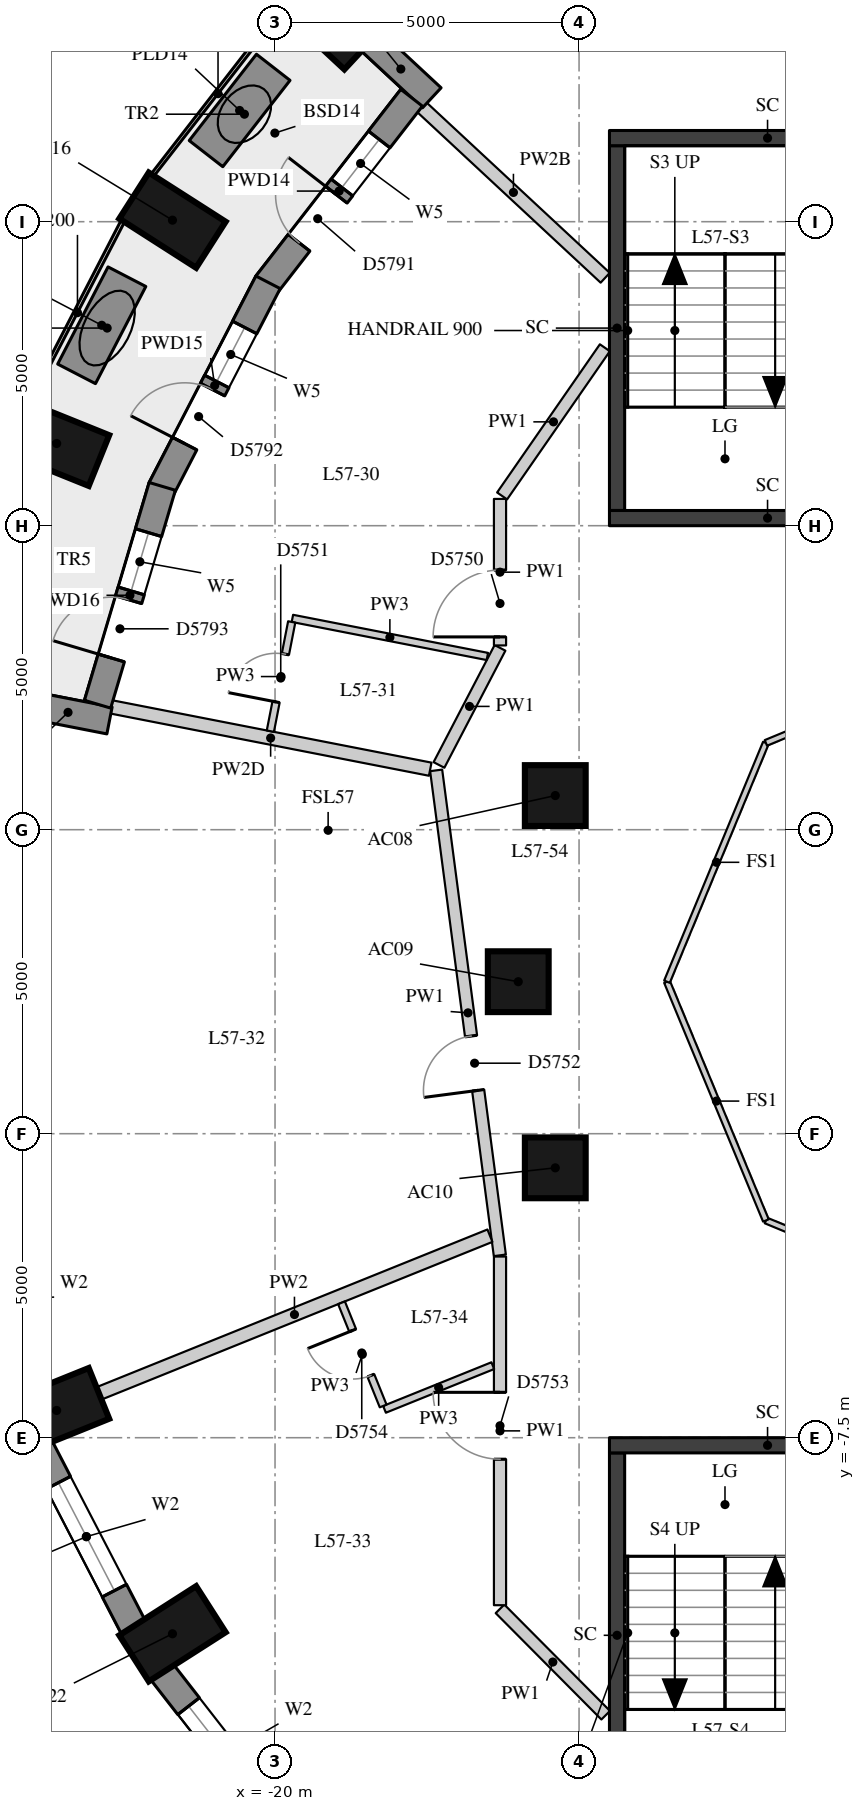
"""IFC4 building model, lengths in metres.
Left out: names, types, materials, properties, quantities, classifications, styles, units other than length and angle.
Written with IfcOpenShell. Run it as: python <this file> out.ifc"""

import sys

from ifc_helpers import new_model, si_unit, direction, frame, frame_2d, origin, origin_2d, place, context, subcontext, project, spatial, rectangle, extrude, element, fill, save


model = new_model("IFC4")
c1 = context("Model", 3, precision=1e-05, world=origin(), true_north=direction((0.0, 1.0)))
c2 = subcontext(c1, "Body", "Model", "MODEL_VIEW")
j1 = project(units=[si_unit("LENGTHUNIT", "METRE"), si_unit("PLANEANGLEUNIT", "RADIAN")], contexts=[c1])
p1 = place(None, origin())
s1 = spatial("IfcSite", under=j1, at=p1, CompositionType="ELEMENT")
p2 = place(p1, origin())
s2 = spatial("IfcBuilding", under=s1, at=p2, CompositionType="ELEMENT")
p3 = place(p2, frame((0.0, 0.0, 202.4)))
s3 = spatial("IfcBuildingStorey", under=s2, at=p3, CompositionType="ELEMENT", Elevation=202.4)
for number, where, z_axis, x_axis in (
    (1, (-19.102, 15.845, 0.0), (0.0, 0.0, 1.0), (-0.732, 0.681, 0.0)),
    (2, (-21.687, 12.525, 0.0), (0.0, 0.0, 1.0), (-0.842, 0.539, 0.0)),
    (3, (-23.591, 8.852, 0.0), (0.0, 0.0, 1.0), (-0.927, 0.374, 0.0)),
    (4, (-23.591, -7.052, 0.0), (0.0, 0.0, 1.0), (-0.927, -0.374, 0.0)),
    (5, (-21.687, -10.725, 0.0), (0.0, 0.0, 1.0), (-0.842, -0.539, 0.0)),
):
    element("IfcColumn", number, at=place(p3, frame(where, z_axis=z_axis, x_axis=x_axis)), inside=s3, PredefinedType="COLUMN", context=c2, shape_type="SweptSolid", body=[
        extrude(rectangle(XDim=1.5, YDim=0.9, at=origin_2d()), origin(), (0.0, 0.0, 1.0), 3.3),
    ])
for number, where, z_axis, x_axis in (
    (6, (-15.391, 3.062, 0.0), (0.0, 0.0, 1.0), (1.0, 0.0, 0.0)),
    (7, (-16.0, 0.0, 0.0), (0.0, 0.0, 1.0), (1.0, 0.0, 0.0)),
    (8, (-15.391, -3.062, 0.0), (0.0, 0.0, 1.0), (1.0, 0.0, 0.0)),
):
    element("IfcColumn", number, at=place(p3, frame(where, z_axis=z_axis, x_axis=x_axis)), inside=s3, PredefinedType="COLUMN", context=c2, shape_type="SweptSolid", body=[
        extrude(rectangle(XDim=1.0, YDim=1.0, at=origin_2d()), origin(), (0.0, 0.0, 1.0), 3.3),
    ])
p4 = place(p3, frame((-23.878, -7.632, 0.0), z_axis=(0.0, 0.0, 1.0), x_axis=(0.460232593174, -0.887798378113, 0.0)))
e9 = element("IfcWall", 9, at=p4, inside=s3, PredefinedType="SOLIDWALL", context=c2, shape_type="SweptSolid", body=[
    extrude(rectangle(XDim=3.371, YDim=0.45, at=frame_2d((1.685, 0.0))), origin(), (0.0, 0.0, 1.0), 3.02),
])
p5 = place(p4, frame((0.685, 0.0, 0.4)))
e10 = element("IfcOpeningElement", 10, at=p5, cuts=e9, PredefinedType="OPENING", context=c2, shape_type="SweptSolid", body=[
    extrude(rectangle(XDim=2.0, YDim=1.75, at=frame_2d((1.0, 0.875))), frame((0.0, 0.235, 0.0), z_axis=(0.0, -1.0, 0.0), x_axis=(1.0, 0.0, 0.0)), (0.0, 0.0, 1.0), 0.47),
])
p6 = place(p3, frame((-21.863, -11.348, 0.0), z_axis=(0.0, 0.0, 1.0), x_axis=(0.614255239631, -0.789107407509, 0.0)))
e11 = element("IfcWall", 11, at=p6, inside=s3, PredefinedType="SOLIDWALL", context=c2, shape_type="SweptSolid", body=[
    extrude(rectangle(XDim=3.438, YDim=0.45, at=frame_2d((1.719, 0.0))), origin(), (0.0, 0.0, 1.0), 3.02),
])
p7 = place(p6, frame((0.719, 0.0, 0.4)))
e12 = element("IfcOpeningElement", 12, at=p7, cuts=e11, PredefinedType="OPENING", context=c2, shape_type="SweptSolid", body=[
    extrude(rectangle(XDim=2.0, YDim=1.75, at=frame_2d((1.0, 0.875))), frame((0.0, 0.235, 0.0), z_axis=(0.0, -1.0, 0.0), x_axis=(1.0, 0.0, 0.0)), (0.0, 0.0, 1.0), 0.47),
])
p8 = place(p3, frame((-18.44, 15.484, 0.0), z_axis=(0.0, 0.0, 1.0), x_axis=(0.732268156969, -0.681016406769, 0.0)))
e13 = element("IfcWall", 13, at=p8, inside=s3, PredefinedType="SOLIDWALL", context=c2, shape_type="SweptSolid", body=[
    extrude(rectangle(XDim=1.391, YDim=0.45, at=frame_2d((0.695, 0.0))), origin(), (0.0, 0.0, 1.0), 2.57),
])
p9 = place(p3, frame((-24.087, 4.563, 0.0), z_axis=(0.0, 0.0, 1.0), x_axis=(0.98143579878, -0.191790961394, 0.0)))
e14 = element("IfcWall", 14, at=p9, inside=s3, PredefinedType="SOLIDWALL", context=c2, shape_type="SweptSolid", body=[
    extrude(rectangle(XDim=1.39, YDim=0.45, at=frame_2d((0.695, 0.0))), origin(), (0.0, 0.0, 1.0), 2.47),
])
p10 = place(p3, frame((-17.754, 14.539, 0.0), z_axis=(0.0, 0.0, 1.0), x_axis=(-0.613174901215, -0.789947175779, 0.0)))
e15 = element("IfcWall", 15, at=p10, inside=s3, PredefinedType="SOLIDWALL", context=c2, shape_type="SweptSolid", body=[
    extrude(rectangle(XDim=3.886, YDim=0.45, at=frame_2d((1.943, 0.0))), origin(), (0.0, 0.0, 1.0), 3.02),
])
p11 = place(p10, frame((0.868, 0.0, 0.4)))
e16 = element("IfcOpeningElement", 16, at=p11, cuts=e15, PredefinedType="OPENING", context=c2, shape_type="SweptSolid", body=[
    extrude(rectangle(XDim=1.0, YDim=1.75, at=frame_2d((0.5, 0.875))), frame((0.0, 0.235, 0.0), z_axis=(0.0, -1.0, 0.0), x_axis=(1.0, 0.0, 0.0)), (0.0, 0.0, 1.0), 0.47),
])
p12 = place(p10, frame((2.018, 0.0, 0.0)))
e17 = element("IfcOpeningElement", 17, at=p12, cuts=e15, PredefinedType="OPENING", context=c2, shape_type="SweptSolid", body=[
    extrude(rectangle(XDim=1.0, YDim=2.15, at=frame_2d((0.5, 1.075))), frame((0.0, 0.235, 0.0), z_axis=(0.0, -1.0, 0.0), x_axis=(1.0, 0.0, 0.0)), (0.0, 0.0, 1.0), 0.47),
])
p13 = place(p3, frame((-20.115, 11.503, 0.0), z_axis=(0.0, 0.0, 1.0), x_axis=(-0.459205720451, -0.888329953511, 0.0)))
e18 = element("IfcWall", 18, at=p13, inside=s3, PredefinedType="SOLIDWALL", context=c2, shape_type="SweptSolid", body=[
    extrude(rectangle(XDim=3.823, YDim=0.45, at=frame_2d((1.911, 0.0))), origin(), (0.0, 0.0, 1.0), 3.02),
])
p14 = place(p13, frame((0.836, 0.0, 0.4)))
e19 = element("IfcOpeningElement", 19, at=p14, cuts=e18, PredefinedType="OPENING", context=c2, shape_type="SweptSolid", body=[
    extrude(rectangle(XDim=1.0, YDim=1.75, at=frame_2d((0.5, 0.875))), frame((0.0, 0.235, 0.0), z_axis=(0.0, -1.0, 0.0), x_axis=(1.0, 0.0, 0.0)), (0.0, 0.0, 1.0), 0.47),
])
p15 = place(p13, frame((1.986, 0.0, 0.0)))
e20 = element("IfcOpeningElement", 20, at=p15, cuts=e18, PredefinedType="OPENING", context=c2, shape_type="SweptSolid", body=[
    extrude(rectangle(XDim=1.0, YDim=2.15, at=frame_2d((0.5, 1.075))), frame((0.0, 0.235, 0.0), z_axis=(0.0, -1.0, 0.0), x_axis=(1.0, 0.0, 0.0)), (0.0, 0.0, 1.0), 0.47),
])
p16 = place(p3, frame((-21.854, 8.146, 0.0), z_axis=(0.0, 0.0, 1.0), x_axis=(-0.284757753004, -0.958599510799, 0.0)))
e21 = element("IfcWall", 21, at=p16, inside=s3, PredefinedType="SOLIDWALL", context=c2, shape_type="SweptSolid", body=[
    extrude(rectangle(XDim=3.737, YDim=0.45, at=frame_2d((1.869, 0.0))), origin(), (0.0, 0.0, 1.0), 3.02),
])
p17 = place(p16, frame((0.794, 0.0, 0.4)))
e22 = element("IfcOpeningElement", 22, at=p17, cuts=e21, PredefinedType="OPENING", context=c2, shape_type="SweptSolid", body=[
    extrude(rectangle(XDim=1.0, YDim=1.75, at=frame_2d((0.5, 0.875))), frame((0.0, 0.235, 0.0), z_axis=(0.0, -1.0, 0.0), x_axis=(1.0, 0.0, 0.0)), (0.0, 0.0, 1.0), 0.47),
])
p18 = place(p16, frame((1.944, 0.0, 0.0)))
e23 = element("IfcOpeningElement", 23, at=p18, cuts=e21, PredefinedType="OPENING", context=c2, shape_type="SweptSolid", body=[
    extrude(rectangle(XDim=1.0, YDim=2.15, at=frame_2d((0.5, 1.075))), frame((0.0, 0.235, 0.0), z_axis=(0.0, -1.0, 0.0), x_axis=(1.0, 0.0, 0.0)), (0.0, 0.0, 1.0), 0.47),
])
for number, where, z_axis, x_axis in (
    (24, (-20.03, 15.04, 0.0), (0.0, 0.0, 1.0), (-0.614, -0.789, 0.0)),
    (25, (-22.436, 11.595, 0.0), (0.0, 0.0, 1.0), (-0.46, -0.888, 0.0)),
):
    element("IfcWall", number, at=place(p3, frame(where, z_axis=z_axis, x_axis=x_axis)), inside=s3, PredefinedType="USERDEFINED", context=c2, shape_type="SweptSolid", body=[
        extrude(rectangle(XDim=1.8, YDim=0.7, at=frame_2d((0.9, 0.0))), origin(), (0.0, 0.0, 1.0), 0.75),
    ])
p19 = place(p3, frame((-14.375, 7.75, -0.28), z_axis=(0.0, 0.0, 1.0), x_axis=(0.0, 1.0, 0.0)))
e26 = element("IfcWall", 26, at=p19, inside=s3, PredefinedType="SHEAR", context=c2, shape_type="SweptSolid", body=[
    extrude(rectangle(XDim=6.0, YDim=0.25, at=frame_2d((3.0, 0.0))), origin(), (0.0, 0.0, 1.0), 3.3),
])
for number, where, z_axis, x_axis in (
    (27, (-14.5, 13.875, -0.28), (0.0, 0.0, 1.0), (1.0, 0.0, 0.0)),
    (28, (-14.5, 7.625, -0.28), (0.0, 0.0, 1.0), (1.0, 0.0, 0.0)),
):
    element("IfcWall", number, at=place(p3, frame(where, z_axis=z_axis, x_axis=x_axis)), inside=s3, PredefinedType="SHEAR", context=c2, shape_type="SweptSolid", body=[
        extrude(rectangle(XDim=5.2, YDim=0.25, at=frame_2d((2.6, 0.0))), origin(), (0.0, 0.0, 1.0), 3.3),
    ])
p20 = place(p3, frame((-14.375, -13.75, -0.28), z_axis=(0.0, 0.0, 1.0), x_axis=(0.0, 1.0, 0.0)))
e29 = element("IfcWall", 29, at=p20, inside=s3, PredefinedType="SHEAR", context=c2, shape_type="SweptSolid", body=[
    extrude(rectangle(XDim=6.0, YDim=0.25, at=frame_2d((3.0, 0.0))), origin(), (0.0, 0.0, 1.0), 3.3),
])
p21 = place(p3, frame((-14.5, -7.625, -0.28), z_axis=(0.0, 0.0, 1.0), x_axis=(1.0, 0.0, 0.0)))
e30 = element("IfcWall", 30, at=p21, inside=s3, PredefinedType="SHEAR", context=c2, shape_type="SweptSolid", body=[
    extrude(rectangle(XDim=5.2, YDim=0.25, at=frame_2d((2.6, 0.0))), origin(), (0.0, 0.0, 1.0), 3.3),
])
p22 = place(p3, frame((-14.562, -12.064, 0.0), z_axis=(0.0, 0.0, 1.0), x_axis=(-0.704826289083, 0.709379942074, 0.0)))
e31 = element("IfcWall", 31, at=p22, inside=s3, PredefinedType="PARTITIONING", context=c2, shape_type="SweptSolid", body=[
    extrude(rectangle(XDim=2.466, YDim=0.2, at=frame_2d((1.233, 0.0))), origin(), (0.0, 0.0, 1.0), 3.02),
])
p23 = place(p3, frame((-16.3, -10.255, 0.0), z_axis=(0.0, 0.0, 1.0), x_axis=(0.0, 1.0, 0.0)))
e32 = element("IfcWall", 32, at=p23, inside=s3, PredefinedType="PARTITIONING", context=c2, shape_type="SweptSolid", body=[
    extrude(rectangle(XDim=5.734, YDim=0.2, at=frame_2d((2.867, 0.0))), origin(), (0.0, 0.0, 1.0), 3.02),
])
p24 = place(p23, frame((2.401, 0.0, 0.0)))
e33 = element("IfcOpeningElement", 33, at=p24, cuts=e32, PredefinedType="OPENING", context=c2, shape_type="SweptSolid", body=[
    extrude(rectangle(XDim=1.1, YDim=2.1, at=frame_2d((0.55, 1.05))), frame((0.0, 0.11, 0.0), z_axis=(0.0, -1.0, 0.0), x_axis=(1.0, 0.0, 0.0)), (0.0, 0.0, 1.0), 0.22),
])
p25 = place(p3, frame((-16.303, -4.501, 0.0), z_axis=(0.0, 0.0, 1.0), x_axis=(-0.130191522351, 0.991488864036, 0.0)))
e34 = element("IfcWall", 34, at=p25, inside=s3, PredefinedType="PARTITIONING", context=c2, shape_type="SweptSolid", body=[
    extrude(rectangle(XDim=8.045, YDim=0.2, at=frame_2d((4.022, 0.0))), origin(), (0.0, 0.0, 1.0), 3.02),
])
p26 = place(p25, frame((2.738, 0.0, 0.0)))
e35 = element("IfcOpeningElement", 35, at=p26, cuts=e34, PredefinedType="OPENING", context=c2, shape_type="SweptSolid", body=[
    extrude(rectangle(XDim=0.9, YDim=2.1, at=frame_2d((0.45, 1.05))), frame((0.0, 0.11, 0.0), z_axis=(0.0, -1.0, 0.0), x_axis=(1.0, 0.0, 0.0)), (0.0, 0.0, 1.0), 0.22),
])
p27 = place(p3, frame((-17.304, 3.565, 0.0), z_axis=(0.0, 0.0, 1.0), x_axis=(0.46212415324, 0.886815238363, 0.0)))
e36 = element("IfcWall", 36, at=p27, inside=s3, PredefinedType="PARTITIONING", context=c2, shape_type="SweptSolid", body=[
    extrude(rectangle(XDim=2.172, YDim=0.2, at=frame_2d((1.086, 0.0))), origin(), (0.0, 0.0, 1.0), 3.02),
])
p28 = place(p3, frame((-16.3, 5.531, 0.0), z_axis=(0.0, 0.0, 1.0), x_axis=(0.0, 1.0, 0.0)))
e37 = element("IfcWall", 37, at=p28, inside=s3, PredefinedType="PARTITIONING", context=c2, shape_type="SweptSolid", body=[
    extrude(rectangle(XDim=2.409, YDim=0.2, at=frame_2d((1.205, 0.0))), origin(), (0.0, 0.0, 1.0), 3.02),
])
p29 = place(p28, frame((0.14, 0.0, 0.0)))
e38 = element("IfcOpeningElement", 38, at=p29, cuts=e37, PredefinedType="OPENING", context=c2, shape_type="SweptSolid", body=[
    extrude(rectangle(XDim=1.1, YDim=2.1, at=frame_2d((0.55, 1.05))), frame((0.0, 0.11, 0.0), z_axis=(0.0, -1.0, 0.0), x_axis=(1.0, 0.0, 0.0)), (0.0, 0.0, 1.0), 0.22),
])
p30 = place(p3, frame((-16.266, 7.989, 0.0), z_axis=(0.0, 0.0, 1.0), x_axis=(0.569860411146, 0.821741511552, 0.0)))
e39 = element("IfcWall", 39, at=p30, inside=s3, PredefinedType="PARTITIONING", context=c2, shape_type="SweptSolid", body=[
    extrude(rectangle(XDim=2.966, YDim=0.2, at=frame_2d((1.483, 0.0))), origin(), (0.0, 0.0, 1.0), 3.02),
])
p31 = place(p3, frame((-17.588, 14.385, 0.0), z_axis=(0.0, 0.0, 1.0), x_axis=(0.732259547802, -0.681025663725, 0.0)))
e40 = element("IfcWall", 40, at=p31, inside=s3, PredefinedType="PARTITIONING", context=c2, shape_type="SweptSolid", body=[
    extrude(rectangle(XDim=4.122, YDim=0.22, at=frame_2d((2.061, 0.0))), origin(), (0.0, 0.0, 1.0), 2.57),
])
p32 = place(p3, frame((-22.697, 4.521, 0.0), z_axis=(0.0, 0.0, 1.0), x_axis=(0.981448712972, -0.19172486486, 0.0)))
e41 = element("IfcWall", 41, at=p32, inside=s3, PredefinedType="PARTITIONING", context=c2, shape_type="SweptSolid", body=[
    extrude(rectangle(XDim=5.348, YDim=0.22, at=frame_2d((2.674, 0.0))), origin(), (0.0, 0.0, 1.0), 2.47),
])
p33 = place(p3, frame((-22.896, -6.771, 0.0), z_axis=(0.0, 0.0, 1.0), x_axis=(0.927377440276, 0.374127095073, 0.0)))
e42 = element("IfcWall", 42, at=p33, inside=s3, PredefinedType="PARTITIONING", context=c2, shape_type="SweptSolid", body=[
    extrude(rectangle(XDim=6.933, YDim=0.22, at=frame_2d((3.467, 0.0))), origin(), (0.0, 0.0, 1.0), 3.02),
])
p34 = place(p3, frame((-16.508, 5.349, 0.0), z_axis=(0.0, 0.0, 1.0), x_axis=(-0.981441910277, 0.191759684898, 0.0)))
e43 = element("IfcWall", 43, at=p34, inside=s3, PredefinedType="PARTITIONING", context=c2, shape_type="SweptSolid", body=[
    extrude(rectangle(XDim=3.267, YDim=0.12, at=frame_2d((1.633, 0.0))), origin(), (0.0, 0.0, 1.0), 3.02),
])
p35 = place(p3, frame((-16.419, -6.315, 0.0), z_axis=(0.0, 0.0, 1.0), x_axis=(-0.927358946461, -0.374172933841, 0.0)))
e44 = element("IfcWall", 44, at=p35, inside=s3, PredefinedType="PARTITIONING", context=c2, shape_type="SweptSolid", body=[
    extrude(rectangle(XDim=1.92, YDim=0.12, at=frame_2d((0.96, 0.0))), origin(), (0.0, 0.0, 1.0), 3.02),
])
p36 = place(p3, frame((-19.726, 5.917, 0.0), z_axis=(0.0, 0.0, 1.0), x_axis=(-0.191830051998, -0.981428158935, 0.0)))
e45 = element("IfcWall", 45, at=p36, inside=s3, PredefinedType="PARTITIONING", context=c2, shape_type="SweptSolid", body=[
    extrude(rectangle(XDim=1.83, YDim=0.12, at=frame_2d((0.915, 0.0))), origin(), (0.0, 0.0, 1.0), 3.02),
])
p37 = place(p36, frame((0.54, 0.0, 0.0)))
e46 = element("IfcOpeningElement", 46, at=p37, cuts=e45, PredefinedType="OPENING", context=c2, shape_type="SweptSolid", body=[
    extrude(rectangle(XDim=0.8, YDim=2.1, at=frame_2d((0.4, 1.05))), frame((0.0, 0.07, 0.0), z_axis=(0.0, -1.0, 0.0), x_axis=(1.0, 0.0, 0.0)), (0.0, 0.0, 1.0), 0.14),
])
p38 = place(p3, frame((-18.222, -6.978, 0.0), z_axis=(0.0, 0.0, 1.0), x_axis=(-0.374218187905, 0.927340685963, 0.0)))
e47 = element("IfcWall", 47, at=p38, inside=s3, PredefinedType="PARTITIONING", context=c2, shape_type="SweptSolid", body=[
    extrude(rectangle(XDim=1.83, YDim=0.12, at=frame_2d((0.915, 0.0))), origin(), (0.0, 0.0, 1.0), 3.02),
])
p39 = place(p38, frame((0.54, 0.0, 0.0)))
e48 = element("IfcOpeningElement", 48, at=p39, cuts=e47, PredefinedType="OPENING", context=c2, shape_type="SweptSolid", body=[
    extrude(rectangle(XDim=0.8, YDim=2.1, at=frame_2d((0.4, 1.05))), frame((0.0, 0.07, 0.0), z_axis=(0.0, -1.0, 0.0), x_axis=(1.0, 0.0, 0.0)), (0.0, 0.0, 1.0), 0.14),
])
for number, where, z_axis, x_axis in (
    (49, (-8.0, -5.554, 0.0), (0.0, 0.0, 1.0), (-0.924, 0.383, 0.0)),
    (50, (-11.927, -3.927, 0.0), (0.0, 0.0, 1.0), (-0.383, 0.924, 0.0)),
    (51, (-13.554, 0.0, 0.0), (0.0, 0.0, 1.0), (0.383, 0.924, 0.0)),
    (52, (-11.927, 3.927, 0.0), (0.0, 0.0, 1.0), (0.924, 0.383, 0.0)),
):
    element("IfcWall", number, at=place(p3, frame(where, z_axis=z_axis, x_axis=x_axis)), inside=s3, PredefinedType="PARTITIONING", context=c2, shape_type="SweptSolid", body=[
        extrude(rectangle(XDim=4.251, YDim=0.1, at=frame_2d((2.125, 0.0))), origin(), (0.0, 0.0, 1.0), 3.02),
    ])
p40 = place(p5, origin())
e53 = element("IfcWindow", 53, at=p40, inside=s3, PartitioningType="SINGLE_PANEL", PredefinedType="WINDOW", context=c2, shape_type="SweptSolid", body=[
    extrude(rectangle(XDim=2.0, YDim=1.75, at=frame_2d((1.0, 0.875))), frame((0.0, 0.035, 0.0), z_axis=(0.0, -1.0, 0.0), x_axis=(1.0, 0.0, 0.0)), (0.0, 0.0, 1.0), 0.06),
])
fill(e10, e53)
p41 = place(p7, origin())
e54 = element("IfcWindow", 54, at=p41, inside=s3, PartitioningType="SINGLE_PANEL", PredefinedType="WINDOW", context=c2, shape_type="SweptSolid", body=[
    extrude(rectangle(XDim=2.0, YDim=1.75, at=frame_2d((1.0, 0.875))), frame((0.0, 0.035, 0.0), z_axis=(0.0, -1.0, 0.0), x_axis=(1.0, 0.0, 0.0)), (0.0, 0.0, 1.0), 0.06),
])
fill(e12, e54)
p42 = place(p11, origin())
e55 = element("IfcWindow", 55, at=p42, inside=s3, PartitioningType="SINGLE_PANEL", PredefinedType="WINDOW", context=c2, shape_type="SweptSolid", body=[
    extrude(rectangle(XDim=1.0, YDim=1.75, at=frame_2d((0.5, 0.875))), frame((0.0, 0.035, 0.0), z_axis=(0.0, -1.0, 0.0), x_axis=(1.0, 0.0, 0.0)), (0.0, 0.0, 1.0), 0.06),
])
fill(e16, e55)
p43 = place(p12, frame((1.0, 0.0, 0.0), z_axis=(0.0, 0.0, 1.0), x_axis=(-1.0, 0.0, 0.0)))
e56 = element("IfcDoor", 56, at=p43, inside=s3, OperationType="SINGLE_SWING_RIGHT", PredefinedType="DOOR", context=c2, shape_type="SweptSolid", body=[
    extrude(rectangle(XDim=1.0, YDim=2.15, at=frame_2d((0.5, 1.075))), frame((0.0, 0.075, 0.0), z_axis=(0.0, -1.0, 0.0), x_axis=(1.0, 0.0, 0.0)), (0.0, 0.0, 1.0), 0.05),
])
fill(e17, e56)
p44 = place(p14, origin())
e57 = element("IfcWindow", 57, at=p44, inside=s3, PartitioningType="SINGLE_PANEL", PredefinedType="WINDOW", context=c2, shape_type="SweptSolid", body=[
    extrude(rectangle(XDim=1.0, YDim=1.75, at=frame_2d((0.5, 0.875))), frame((0.0, 0.035, 0.0), z_axis=(0.0, -1.0, 0.0), x_axis=(1.0, 0.0, 0.0)), (0.0, 0.0, 1.0), 0.06),
])
fill(e19, e57)
p45 = place(p15, frame((1.0, 0.0, 0.0), z_axis=(0.0, 0.0, 1.0), x_axis=(-1.0, 0.0, 0.0)))
e58 = element("IfcDoor", 58, at=p45, inside=s3, OperationType="SINGLE_SWING_LEFT", PredefinedType="DOOR", context=c2, shape_type="SweptSolid", body=[
    extrude(rectangle(XDim=1.0, YDim=2.15, at=frame_2d((0.5, 1.075))), frame((0.0, 0.075, 0.0), z_axis=(0.0, -1.0, 0.0), x_axis=(1.0, 0.0, 0.0)), (0.0, 0.0, 1.0), 0.05),
])
fill(e20, e58)
p46 = place(p17, origin())
e59 = element("IfcWindow", 59, at=p46, inside=s3, PartitioningType="SINGLE_PANEL", PredefinedType="WINDOW", context=c2, shape_type="SweptSolid", body=[
    extrude(rectangle(XDim=1.0, YDim=1.75, at=frame_2d((0.5, 0.875))), frame((0.0, 0.035, 0.0), z_axis=(0.0, -1.0, 0.0), x_axis=(1.0, 0.0, 0.0)), (0.0, 0.0, 1.0), 0.06),
])
fill(e22, e59)
p47 = place(p18, frame((1.0, 0.0, 0.0), z_axis=(0.0, 0.0, 1.0), x_axis=(-1.0, 0.0, 0.0)))
e60 = element("IfcDoor", 60, at=p47, inside=s3, OperationType="SINGLE_SWING_LEFT", PredefinedType="DOOR", context=c2, shape_type="SweptSolid", body=[
    extrude(rectangle(XDim=1.0, YDim=2.15, at=frame_2d((0.5, 1.075))), frame((0.0, 0.075, 0.0), z_axis=(0.0, -1.0, 0.0), x_axis=(1.0, 0.0, 0.0)), (0.0, 0.0, 1.0), 0.05),
])
fill(e23, e60)
p48 = place(p29, origin())
e61 = element("IfcDoor", 61, at=p48, inside=s3, OperationType="SINGLE_SWING_LEFT", PredefinedType="DOOR", context=c2, shape_type="SweptSolid", body=[
    extrude(rectangle(XDim=1.1, YDim=2.1, at=frame_2d((0.55, 1.05))), frame((0.0, 0.025, 0.0), z_axis=(0.0, -1.0, 0.0), x_axis=(1.0, 0.0, 0.0)), (0.0, 0.0, 1.0), 0.05),
])
fill(e38, e61)
p49 = place(p37, origin())
e62 = element("IfcDoor", 62, at=p49, inside=s3, OperationType="SINGLE_SWING_LEFT", PredefinedType="DOOR", context=c2, shape_type="SweptSolid", body=[
    extrude(rectangle(XDim=0.8, YDim=2.1, at=frame_2d((0.4, 1.05))), frame((0.0, 0.025, 0.0), z_axis=(0.0, -1.0, 0.0), x_axis=(1.0, 0.0, 0.0)), (0.0, 0.0, 1.0), 0.05),
])
fill(e46, e62)
p50 = place(p26, origin())
e63 = element("IfcDoor", 63, at=p50, inside=s3, OperationType="SINGLE_SWING_LEFT", PredefinedType="DOOR", context=c2, shape_type="SweptSolid", body=[
    extrude(rectangle(XDim=0.9, YDim=2.1, at=frame_2d((0.45, 1.05))), frame((0.0, 0.025, 0.0), z_axis=(0.0, -1.0, 0.0), x_axis=(1.0, 0.0, 0.0)), (0.0, 0.0, 1.0), 0.05),
])
fill(e35, e63)
p51 = place(p24, origin())
e64 = element("IfcDoor", 64, at=p51, inside=s3, OperationType="SINGLE_SWING_RIGHT", PredefinedType="DOOR", context=c2, shape_type="SweptSolid", body=[
    extrude(rectangle(XDim=1.1, YDim=2.1, at=frame_2d((0.55, 1.05))), frame((0.0, 0.025, 0.0), z_axis=(0.0, -1.0, 0.0), x_axis=(1.0, 0.0, 0.0)), (0.0, 0.0, 1.0), 0.05),
])
fill(e33, e64)
p52 = place(p39, origin())
e65 = element("IfcDoor", 65, at=p52, inside=s3, OperationType="SINGLE_SWING_RIGHT", PredefinedType="DOOR", context=c2, shape_type="SweptSolid", body=[
    extrude(rectangle(XDim=0.8, YDim=2.1, at=frame_2d((0.4, 1.05))), frame((0.0, 0.025, 0.0), z_axis=(0.0, -1.0, 0.0), x_axis=(1.0, 0.0, 0.0)), (0.0, 0.0, 1.0), 0.05),
])
fill(e48, e65)
save(model, sys.argv[1])
